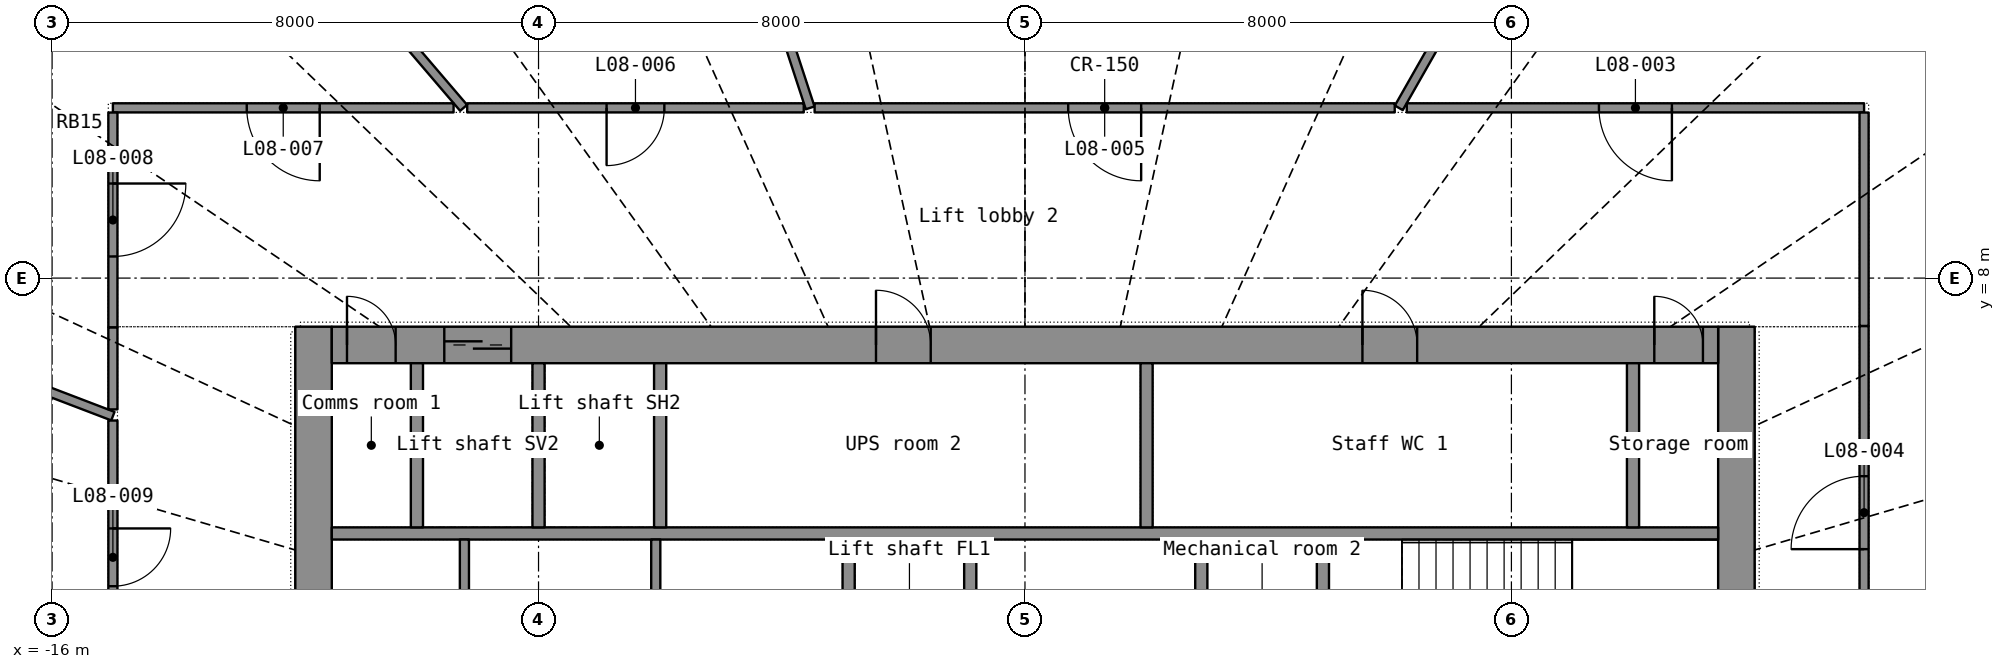
"""IFC4 building model, lengths in metres.
Left out: names, types, materials, properties, quantities, classifications, styles, units other than length and angle.
Written with IfcOpenShell. Run it as: python <this file> out.ifc"""

import sys

from ifc_helpers import new_model, si_unit, direction, frame, frame_2d, origin, place, context, subcontext, project, spatial, rectangle, extrude, element, fill, save


model = new_model("IFC4")
c1 = context("Model", 3, precision=1e-05, world=origin(), true_north=direction((0.0, 1.0)))
c2 = subcontext(c1, "Body", "Model", "MODEL_VIEW")
j1 = project(units=[si_unit("LENGTHUNIT", "METRE"), si_unit("PLANEANGLEUNIT", "RADIAN")], contexts=[c1])
p1 = place(None, origin())
s1 = spatial("IfcSite", under=j1, at=p1, CompositionType="ELEMENT")
p2 = place(p1, origin())
s2 = spatial("IfcBuilding", under=s1, at=p2, CompositionType="ELEMENT")
p3 = place(p2, frame((0.0, 0.0, 40.8)))
s3 = spatial("IfcBuildingStorey", under=s2, at=p3, CompositionType="ELEMENT", Elevation=40.8)
p4 = place(p3, frame((-11.7, -7.2, 0.0), z_axis=(0.0, 0.0, 1.0), x_axis=(0.0, 1.0, 0.0)))
e1 = element("IfcWall", 1, at=p4, inside=s3, PredefinedType="SHEAR", context=c2, shape_type="SweptSolid", body=[
    extrude(rectangle(XDim=14.4, YDim=0.6, at=frame_2d((7.2, 0.0))), origin(), (0.0, 0.0, 1.0), 3.3),
])
p5 = place(p4, frame((6.5, 0.0, 0.0)))
e2 = element("IfcOpeningElement", 2, at=p5, cuts=e1, PredefinedType="OPENING", context=c2, shape_type="SweptSolid", body=[
    extrude(rectangle(XDim=1.4, YDim=2.2, at=frame_2d((0.7, 1.1))), frame((0.0, 0.31, 0.0), z_axis=(0.0, -1.0, 0.0), x_axis=(1.0, 0.0, 0.0)), (0.0, 0.0, 1.0), 0.62),
])
p6 = place(p3, frame((11.7, -7.2, 0.0), z_axis=(0.0, 0.0, 1.0), x_axis=(0.0, 1.0, 0.0)))
e3 = element("IfcWall", 3, at=p6, inside=s3, PredefinedType="SHEAR", context=c2, shape_type="SweptSolid", body=[
    extrude(rectangle(XDim=14.4, YDim=0.6, at=frame_2d((7.2, 0.0))), origin(), (0.0, 0.0, 1.0), 3.3),
])
p7 = place(p6, frame((6.5, 0.0, 0.0)))
e4 = element("IfcOpeningElement", 4, at=p7, cuts=e3, PredefinedType="OPENING", context=c2, shape_type="SweptSolid", body=[
    extrude(rectangle(XDim=1.4, YDim=2.2, at=frame_2d((0.7, 1.1))), frame((0.0, 0.31, 0.0), z_axis=(0.0, -1.0, 0.0), x_axis=(1.0, 0.0, 0.0)), (0.0, 0.0, 1.0), 0.62),
])
p8 = place(p3, frame((-11.4, 6.9, 0.0), z_axis=(0.0, 0.0, 1.0), x_axis=(1.0, 0.0, 0.0)))
e5 = element("IfcWall", 5, at=p8, inside=s3, PredefinedType="SHEAR", context=c2, shape_type="SweptSolid", body=[
    extrude(rectangle(XDim=22.8, YDim=0.6, at=frame_2d((11.4, 0.0))), origin(), (0.0, 0.0, 1.0), 3.3),
])
p9 = place(p8, frame((1.85, 0.0, 0.0)))
e6 = element("IfcOpeningElement", 6, at=p9, cuts=e5, PredefinedType="OPENING", context=c2, shape_type="SweptSolid", body=[
    extrude(rectangle(XDim=1.1, YDim=2.2, at=frame_2d((0.55, 1.1))), frame((0.0, 0.31, 0.0), z_axis=(0.0, -1.0, 0.0), x_axis=(1.0, 0.0, 0.0)), (0.0, 0.0, 1.0), 0.62),
])
p10 = place(p8, frame((8.95, 0.0, 0.0)))
e7 = element("IfcOpeningElement", 7, at=p10, cuts=e5, PredefinedType="OPENING", context=c2, shape_type="SweptSolid", body=[
    extrude(rectangle(XDim=0.9, YDim=2.1, at=frame_2d((0.45, 1.05))), frame((0.0, 0.31, 0.0), z_axis=(0.0, -1.0, 0.0), x_axis=(1.0, 0.0, 0.0)), (0.0, 0.0, 1.0), 0.62),
])
p11 = place(p8, frame((16.95, 0.0, 0.0)))
e8 = element("IfcOpeningElement", 8, at=p11, cuts=e5, PredefinedType="OPENING", context=c2, shape_type="SweptSolid", body=[
    extrude(rectangle(XDim=0.9, YDim=2.1, at=frame_2d((0.45, 1.05))), frame((0.0, 0.31, 0.0), z_axis=(0.0, -1.0, 0.0), x_axis=(1.0, 0.0, 0.0)), (0.0, 0.0, 1.0), 0.62),
])
p12 = place(p8, frame((0.25, 0.0, 0.0)))
e9 = element("IfcOpeningElement", 9, at=p12, cuts=e5, PredefinedType="OPENING", context=c2, shape_type="SweptSolid", body=[
    extrude(rectangle(XDim=0.8, YDim=2.05, at=frame_2d((0.4, 1.025))), frame((0.0, 0.31, 0.0), z_axis=(0.0, -1.0, 0.0), x_axis=(1.0, 0.0, 0.0)), (0.0, 0.0, 1.0), 0.62),
])
p13 = place(p8, frame((21.75, 0.0, 0.0)))
e10 = element("IfcOpeningElement", 10, at=p13, cuts=e5, PredefinedType="OPENING", context=c2, shape_type="SweptSolid", body=[
    extrude(rectangle(XDim=0.8, YDim=2.05, at=frame_2d((0.4, 1.025))), frame((0.0, 0.31, 0.0), z_axis=(0.0, -1.0, 0.0), x_axis=(1.0, 0.0, 0.0)), (0.0, 0.0, 1.0), 0.62),
])
p14 = place(p3, frame((-11.4, 3.8, 0.0), z_axis=(0.0, 0.0, 1.0), x_axis=(1.0, 0.0, 0.0)))
e11 = element("IfcWall", 11, at=p14, inside=s3, PredefinedType="SHEAR", context=c2, shape_type="SweptSolid", body=[
    extrude(rectangle(XDim=22.8, YDim=0.2, at=frame_2d((11.4, 0.0))), origin(), (0.0, 0.0, 1.0), 3.3),
])
for number, where, z_axis, x_axis in (
    (12, (-10.0, 3.9, 0.0), (0.0, 0.0, 1.0), (0.0, 1.0, 0.0)),
    (13, (-8.0, 3.9, 0.0), (0.0, 0.0, 1.0), (0.0, 1.0, 0.0)),
    (14, (-6.0, 3.9, 0.0), (0.0, 0.0, 1.0), (0.0, 1.0, 0.0)),
    (15, (10.0, 3.9, 0.0), (0.0, 0.0, 1.0), (0.0, 1.0, 0.0)),
):
    element("IfcWall", number, at=place(p3, frame(where, z_axis=z_axis, x_axis=x_axis)), inside=s3, PredefinedType="SHEAR", context=c2, shape_type="SweptSolid", body=[
        extrude(rectangle(XDim=2.7, YDim=0.2, at=frame_2d((1.35, 0.0))), origin(), (0.0, 0.0, 1.0), 3.3),
    ])
p15 = place(p3, frame((2.0, 3.9, 0.0), z_axis=(0.0, 0.0, 1.0), x_axis=(0.0, 1.0, 0.0)))
e16 = element("IfcWall", 16, at=p15, inside=s3, PredefinedType="PARTITIONING", context=c2, shape_type="SweptSolid", body=[
    extrude(rectangle(XDim=2.7, YDim=0.2, at=frame_2d((1.35, 0.0))), origin(), (0.0, 0.0, 1.0), 3.3),
])
p16 = place(p3, frame((-2.9, -3.7, 0.0), z_axis=(0.0, 0.0, 1.0), x_axis=(0.0, 1.0, 0.0)))
e17 = element("IfcWall", 17, at=p16, inside=s3, PredefinedType="SHEAR", context=c2, shape_type="SweptSolid", body=[
    extrude(rectangle(XDim=7.4, YDim=0.2, at=frame_2d((3.7, 0.0))), origin(), (0.0, 0.0, 1.0), 3.3),
])
p17 = place(p16, frame((3.1, 0.0, 0.0)))
e18 = element("IfcOpeningElement", 18, at=p17, cuts=e17, PredefinedType="OPENING", context=c2, shape_type="SweptSolid", body=[
    extrude(rectangle(XDim=1.2, YDim=2.2, at=frame_2d((0.6, 1.1))), frame((0.0, 0.11, 0.0), z_axis=(0.0, -1.0, 0.0), x_axis=(1.0, 0.0, 0.0)), (0.0, 0.0, 1.0), 0.22),
])
p18 = place(p3, frame((2.9, -3.7, 0.0), z_axis=(0.0, 0.0, 1.0), x_axis=(0.0, 1.0, 0.0)))
e19 = element("IfcWall", 19, at=p18, inside=s3, PredefinedType="SHEAR", context=c2, shape_type="SweptSolid", body=[
    extrude(rectangle(XDim=7.4, YDim=0.2, at=frame_2d((3.7, 0.0))), origin(), (0.0, 0.0, 1.0), 3.3),
])
p19 = place(p18, frame((3.1, 0.0, 0.0)))
e20 = element("IfcOpeningElement", 20, at=p19, cuts=e19, PredefinedType="OPENING", context=c2, shape_type="SweptSolid", body=[
    extrude(rectangle(XDim=1.2, YDim=2.2, at=frame_2d((0.6, 1.1))), frame((0.0, 0.11, 0.0), z_axis=(0.0, -1.0, 0.0), x_axis=(1.0, 0.0, 0.0)), (0.0, 0.0, 1.0), 0.22),
])
for number, where, z_axis, x_axis in (
    (21, (-0.9, 1.35, 0.0), (0.0, 0.0, 1.0), (0.0, 1.0, 0.0)),
    (22, (4.9, 1.35, 0.0), (0.0, 0.0, 1.0), (0.0, 1.0, 0.0)),
):
    element("IfcWall", number, at=place(p3, frame(where, z_axis=z_axis, x_axis=x_axis)), inside=s3, PredefinedType="SHEAR", context=c2, shape_type="SweptSolid", body=[
        extrude(rectangle(XDim=2.35, YDim=0.2, at=frame_2d((1.175, 0.0))), origin(), (0.0, 0.0, 1.0), 3.3),
    ])
for number, where, z_axis, x_axis in (
    (23, (-9.219, 1.35, 0.0), (0.0, 0.0, 1.0), (0.0, 1.0, 0.0)),
    (24, (-6.072, 1.35, 0.0), (0.0, 0.0, 1.0), (0.0, 1.0, 0.0)),
):
    element("IfcWall", number, at=place(p3, frame(where, z_axis=z_axis, x_axis=x_axis)), inside=s3, PredefinedType="PARTITIONING", context=c2, shape_type="SweptSolid", body=[
        extrude(rectangle(XDim=2.35, YDim=0.15, at=frame_2d((1.175, 0.0))), origin(), (0.0, 0.0, 1.0), 3.3),
    ])
p20 = place(p3, frame((-7.227, 22.092, 0.0), z_axis=(0.0, 0.0, 1.0), x_axis=(0.310896301, -0.950443838, 0.0)))
e25 = element("IfcWall", 25, at=p20, inside=s3, PredefinedType="PARTITIONING", context=c2, shape_type="SweptSolid", body=[
    extrude(rectangle(XDim=11.881, YDim=0.15, at=frame_2d((5.94, 0.0))), origin(), (0.0, 0.0, 1.0), 2.4),
])
p21 = place(p3, frame((11.801, 20.729, 0.0), z_axis=(0.0, 0.0, 1.0), x_axis=(-0.49473687, -0.869042824, 0.0)))
e26 = element("IfcWall", 26, at=p21, inside=s3, PredefinedType="PARTITIONING", context=c2, shape_type="SweptSolid", body=[
    extrude(rectangle(XDim=11.426, YDim=0.15, at=frame_2d((5.713, 0.0))), origin(), (0.0, 0.0, 1.0), 2.4),
])
p22 = place(p3, frame((-25.324, 9.673, 0.0), z_axis=(0.0, 0.0, 1.0), x_axis=(0.934181171, -0.356799018, 0.0)))
e27 = element("IfcWall", 27, at=p22, inside=s3, PredefinedType="PARTITIONING", context=c2, shape_type="SweptSolid", body=[
    extrude(rectangle(XDim=11.051, YDim=0.15, at=frame_2d((5.526, 0.0))), origin(), (0.0, 0.0, 1.0), 2.4),
])
p23 = place(p3, frame((-16.018, 18.738, 0.0), z_axis=(0.0, 0.0, 1.0), x_axis=(0.649766552, -0.760133822, 0.0)))
e28 = element("IfcWall", 28, at=p23, inside=s3, PredefinedType="PARTITIONING", context=c2, shape_type="SweptSolid", body=[
    extrude(rectangle(XDim=10.443, YDim=0.15, at=frame_2d((5.222, 0.0))), origin(), (0.0, 0.0, 1.0), 2.4),
])
p24 = place(p3, frame((6.081, 10.8, 0.0), z_axis=(0.0, 0.0, 1.0), x_axis=(-1.0, 0.0, 0.0)))
e29 = element("IfcWall", 29, at=p24, inside=s3, PredefinedType="PARTITIONING", context=c2, shape_type="SweptSolid", body=[
    extrude(rectangle(XDim=9.541, YDim=0.15, at=frame_2d((4.771, 0.0))), origin(), (0.0, 0.0, 1.0), 2.4),
])
p25 = place(p24, frame((4.17, 0.0, 0.0)))
e30 = element("IfcOpeningElement", 30, at=p25, cuts=e29, PredefinedType="OPENING", context=c2, shape_type="SweptSolid", body=[
    extrude(rectangle(XDim=1.2, YDim=2.2, at=frame_2d((0.6, 1.1))), frame((0.0, 0.085, 0.0), z_axis=(0.0, -1.0, 0.0), x_axis=(1.0, 0.0, 0.0)), (0.0, 0.0, 1.0), 0.17),
])
p26 = place(p3, frame((13.8, 10.8, 0.0), z_axis=(0.0, 0.0, 1.0), x_axis=(-1.0, 0.0, 0.0)))
e31 = element("IfcWall", 31, at=p26, inside=s3, PredefinedType="PARTITIONING", context=c2, shape_type="SweptSolid", body=[
    extrude(rectangle(XDim=7.521, YDim=0.15, at=frame_2d((3.76, 0.0))), origin(), (0.0, 0.0, 1.0), 2.4),
])
p27 = place(p26, frame((3.16, 0.0, 0.0)))
e32 = element("IfcOpeningElement", 32, at=p27, cuts=e31, PredefinedType="OPENING", context=c2, shape_type="SweptSolid", body=[
    extrude(rectangle(XDim=1.2, YDim=2.2, at=frame_2d((0.6, 1.1))), frame((0.0, 0.085, 0.0), z_axis=(0.0, -1.0, 0.0), x_axis=(1.0, 0.0, 0.0)), (0.0, 0.0, 1.0), 0.17),
])
p28 = place(p3, frame((13.8, 1.072, 0.0), z_axis=(0.0, 0.0, 1.0), x_axis=(0.0, 1.0, 0.0)))
e33 = element("IfcWall", 33, at=p28, inside=s3, PredefinedType="PARTITIONING", context=c2, shape_type="SweptSolid", body=[
    extrude(rectangle(XDim=6.14, YDim=0.15, at=frame_2d((3.07, 0.0))), origin(), (0.0, 0.0, 1.0), 2.4),
])
p29 = place(p28, frame((2.47, 0.0, 0.0)))
e34 = element("IfcOpeningElement", 34, at=p29, cuts=e33, PredefinedType="OPENING", context=c2, shape_type="SweptSolid", body=[
    extrude(rectangle(XDim=1.2, YDim=2.2, at=frame_2d((0.6, 1.1))), frame((0.0, 0.085, 0.0), z_axis=(0.0, -1.0, 0.0), x_axis=(1.0, 0.0, 0.0)), (0.0, 0.0, 1.0), 0.17),
])
p30 = place(p3, frame((-9.397, 10.8, 0.0), z_axis=(0.0, 0.0, 1.0), x_axis=(-1.0, 0.0, 0.0)))
e35 = element("IfcWall", 35, at=p30, inside=s3, PredefinedType="PARTITIONING", context=c2, shape_type="SweptSolid", body=[
    extrude(rectangle(XDim=5.603, YDim=0.15, at=frame_2d((2.801, 0.0))), origin(), (0.0, 0.0, 1.0), 2.4),
])
p31 = place(p30, frame((2.201, 0.0, 0.0)))
e36 = element("IfcOpeningElement", 36, at=p31, cuts=e35, PredefinedType="OPENING", context=c2, shape_type="SweptSolid", body=[
    extrude(rectangle(XDim=1.2, YDim=2.2, at=frame_2d((0.6, 1.1))), frame((0.0, 0.085, 0.0), z_axis=(0.0, -1.0, 0.0), x_axis=(1.0, 0.0, 0.0)), (0.0, 0.0, 1.0), 0.17),
])
p32 = place(p3, frame((-3.638, 10.8, 0.0), z_axis=(0.0, 0.0, 1.0), x_axis=(-1.0, 0.0, 0.0)))
e37 = element("IfcWall", 37, at=p32, inside=s3, PredefinedType="PARTITIONING", context=c2, shape_type="SweptSolid", body=[
    extrude(rectangle(XDim=5.535, YDim=0.15, at=frame_2d((2.768, 0.0))), origin(), (0.0, 0.0, 1.0), 2.4),
])
p33 = place(p32, frame((2.292, 0.0, 0.0)))
e38 = element("IfcOpeningElement", 38, at=p33, cuts=e37, PredefinedType="OPENING", context=c2, shape_type="SweptSolid", body=[
    extrude(rectangle(XDim=0.95, YDim=2.15, at=frame_2d((0.475, 1.075))), frame((0.0, 0.085, 0.0), z_axis=(0.0, -1.0, 0.0), x_axis=(1.0, 0.0, 0.0)), (0.0, 0.0, 1.0), 0.17),
])
p34 = place(p3, frame((-15.0, 5.657, 0.0), z_axis=(0.0, 0.0, 1.0), x_axis=(0.0, -1.0, 0.0)))
e39 = element("IfcWall", 39, at=p34, inside=s3, PredefinedType="PARTITIONING", context=c2, shape_type="SweptSolid", body=[
    extrude(rectangle(XDim=4.5, YDim=0.15, at=frame_2d((2.25, 0.0))), origin(), (0.0, 0.0, 1.0), 2.4),
])
p35 = place(p34, frame((1.775, 0.0, 0.0)))
e40 = element("IfcOpeningElement", 40, at=p35, cuts=e39, PredefinedType="OPENING", context=c2, shape_type="SweptSolid", body=[
    extrude(rectangle(XDim=0.95, YDim=2.15, at=frame_2d((0.475, 1.075))), frame((0.0, 0.085, 0.0), z_axis=(0.0, -1.0, 0.0), x_axis=(1.0, 0.0, 0.0)), (0.0, 0.0, 1.0), 0.17),
])
p36 = place(p3, frame((-15.0, 10.723, 0.0), z_axis=(0.0, 0.0, 1.0), x_axis=(0.0, -1.0, 0.0)))
e41 = element("IfcWall", 41, at=p36, inside=s3, PredefinedType="PARTITIONING", context=c2, shape_type="SweptSolid", body=[
    extrude(rectangle(XDim=3.535, YDim=0.15, at=frame_2d((1.768, 0.0))), origin(), (0.0, 0.0, 1.0), 2.4),
])
p37 = place(p36, frame((1.167, 0.0, 0.0)))
e42 = element("IfcOpeningElement", 42, at=p37, cuts=e41, PredefinedType="OPENING", context=c2, shape_type="SweptSolid", body=[
    extrude(rectangle(XDim=1.2, YDim=2.2, at=frame_2d((0.6, 1.1))), frame((0.0, 0.085, 0.0), z_axis=(0.0, -1.0, 0.0), x_axis=(1.0, 0.0, 0.0)), (0.0, 0.0, 1.0), 0.17),
])
p38 = place(p3, frame((13.8, 7.213, 0.0), z_axis=(0.0, 0.0, 1.0), x_axis=(0.0, 1.0, 0.0)))
e43 = element("IfcWall", 43, at=p38, inside=s3, PredefinedType="PARTITIONING", context=c2, shape_type="SweptSolid", body=[
    extrude(rectangle(XDim=3.51, YDim=0.15, at=frame_2d((1.755, 0.0))), origin(), (0.0, 0.0, 1.0), 2.4),
])
p39 = place(p3, frame((-15.0, 7.187, 0.0), z_axis=(0.0, 0.0, 1.0), x_axis=(0.0, -1.0, 0.0)))
e44 = element("IfcWall", 44, at=p39, inside=s3, PredefinedType="PARTITIONING", context=c2, shape_type="SweptSolid", body=[
    extrude(rectangle(XDim=1.347, YDim=0.15, at=frame_2d((0.673, 0.0))), origin(), (0.0, 0.0, 1.0), 2.4),
])
p40 = place(p9, origin())
e45 = element("IfcDoor", 45, at=p40, inside=s3, OperationType="DOUBLE_DOOR_SLIDING", PredefinedType="DOOR", context=c2, shape_type="SweptSolid", body=[
    extrude(rectangle(XDim=1.1, YDim=2.2, at=frame_2d((0.55, 1.1))), frame((0.0, 0.025, 0.0), z_axis=(0.0, -1.0, 0.0), x_axis=(1.0, 0.0, 0.0)), (0.0, 0.0, 1.0), 0.05),
])
fill(e6, e45)
p41 = place(p10, origin())
e46 = element("IfcDoor", 46, at=p41, inside=s3, OperationType="SINGLE_SWING_LEFT", PredefinedType="DOOR", context=c2, shape_type="SweptSolid", body=[
    extrude(rectangle(XDim=0.9, YDim=2.1, at=frame_2d((0.45, 1.05))), frame((0.0, 0.025, 0.0), z_axis=(0.0, -1.0, 0.0), x_axis=(1.0, 0.0, 0.0)), (0.0, 0.0, 1.0), 0.05),
])
fill(e7, e46)
p42 = place(p11, origin())
e47 = element("IfcDoor", 47, at=p42, inside=s3, OperationType="SINGLE_SWING_LEFT", PredefinedType="DOOR", context=c2, shape_type="SweptSolid", body=[
    extrude(rectangle(XDim=0.9, YDim=2.1, at=frame_2d((0.45, 1.05))), frame((0.0, 0.025, 0.0), z_axis=(0.0, -1.0, 0.0), x_axis=(1.0, 0.0, 0.0)), (0.0, 0.0, 1.0), 0.05),
])
fill(e8, e47)
p43 = place(p12, origin())
e48 = element("IfcDoor", 48, at=p43, inside=s3, OperationType="SINGLE_SWING_LEFT", PredefinedType="DOOR", context=c2, shape_type="SweptSolid", body=[
    extrude(rectangle(XDim=0.8, YDim=2.05, at=frame_2d((0.4, 1.025))), frame((0.0, 0.025, 0.0), z_axis=(0.0, -1.0, 0.0), x_axis=(1.0, 0.0, 0.0)), (0.0, 0.0, 1.0), 0.05),
])
fill(e9, e48)
p44 = place(p13, origin())
e49 = element("IfcDoor", 49, at=p44, inside=s3, OperationType="SINGLE_SWING_LEFT", PredefinedType="DOOR", context=c2, shape_type="SweptSolid", body=[
    extrude(rectangle(XDim=0.8, YDim=2.05, at=frame_2d((0.4, 1.025))), frame((0.0, 0.025, 0.0), z_axis=(0.0, -1.0, 0.0), x_axis=(1.0, 0.0, 0.0)), (0.0, 0.0, 1.0), 0.05),
])
fill(e10, e49)
p45 = place(p27, origin())
e50 = element("IfcDoor", 50, at=p45, inside=s3, OperationType="DOUBLE_DOOR_SINGLE_SWING", PredefinedType="DOOR", context=c2, shape_type="SweptSolid", body=[
    extrude(rectangle(XDim=1.2, YDim=2.2, at=frame_2d((0.6, 1.1))), frame((0.0, 0.025, 0.0), z_axis=(0.0, -1.0, 0.0), x_axis=(1.0, 0.0, 0.0)), (0.0, 0.0, 1.0), 0.05),
])
fill(e32, e50)
p46 = place(p29, origin())
e51 = element("IfcDoor", 51, at=p46, inside=s3, OperationType="DOUBLE_DOOR_SINGLE_SWING", PredefinedType="DOOR", context=c2, shape_type="SweptSolid", body=[
    extrude(rectangle(XDim=1.2, YDim=2.2, at=frame_2d((0.6, 1.1))), frame((0.0, 0.025, 0.0), z_axis=(0.0, -1.0, 0.0), x_axis=(1.0, 0.0, 0.0)), (0.0, 0.0, 1.0), 0.05),
])
fill(e34, e51)
p47 = place(p25, origin())
e52 = element("IfcDoor", 52, at=p47, inside=s3, OperationType="DOUBLE_DOOR_SINGLE_SWING", PredefinedType="DOOR", context=c2, shape_type="SweptSolid", body=[
    extrude(rectangle(XDim=1.2, YDim=2.2, at=frame_2d((0.6, 1.1))), frame((0.0, 0.025, 0.0), z_axis=(0.0, -1.0, 0.0), x_axis=(1.0, 0.0, 0.0)), (0.0, 0.0, 1.0), 0.05),
])
fill(e30, e52)
p48 = place(p33, origin())
e53 = element("IfcDoor", 53, at=p48, inside=s3, OperationType="SINGLE_SWING_RIGHT", PredefinedType="DOOR", context=c2, shape_type="SweptSolid", body=[
    extrude(rectangle(XDim=0.95, YDim=2.15, at=frame_2d((0.475, 1.075))), frame((0.0, 0.025, 0.0), z_axis=(0.0, -1.0, 0.0), x_axis=(1.0, 0.0, 0.0)), (0.0, 0.0, 1.0), 0.05),
])
fill(e38, e53)
p49 = place(p31, origin())
e54 = element("IfcDoor", 54, at=p49, inside=s3, OperationType="DOUBLE_DOOR_SINGLE_SWING", PredefinedType="DOOR", context=c2, shape_type="SweptSolid", body=[
    extrude(rectangle(XDim=1.2, YDim=2.2, at=frame_2d((0.6, 1.1))), frame((0.0, 0.025, 0.0), z_axis=(0.0, -1.0, 0.0), x_axis=(1.0, 0.0, 0.0)), (0.0, 0.0, 1.0), 0.05),
])
fill(e36, e54)
p50 = place(p37, origin())
e55 = element("IfcDoor", 55, at=p50, inside=s3, OperationType="DOUBLE_DOOR_SINGLE_SWING", PredefinedType="DOOR", context=c2, shape_type="SweptSolid", body=[
    extrude(rectangle(XDim=1.2, YDim=2.2, at=frame_2d((0.6, 1.1))), frame((0.0, 0.025, 0.0), z_axis=(0.0, -1.0, 0.0), x_axis=(1.0, 0.0, 0.0)), (0.0, 0.0, 1.0), 0.05),
])
fill(e42, e55)
p51 = place(p35, origin())
e56 = element("IfcDoor", 56, at=p51, inside=s3, OperationType="SINGLE_SWING_LEFT", PredefinedType="DOOR", context=c2, shape_type="SweptSolid", body=[
    extrude(rectangle(XDim=0.95, YDim=2.15, at=frame_2d((0.475, 1.075))), frame((0.0, 0.025, 0.0), z_axis=(0.0, -1.0, 0.0), x_axis=(1.0, 0.0, 0.0)), (0.0, 0.0, 1.0), 0.05),
])
fill(e40, e56)
save(model, sys.argv[1])
